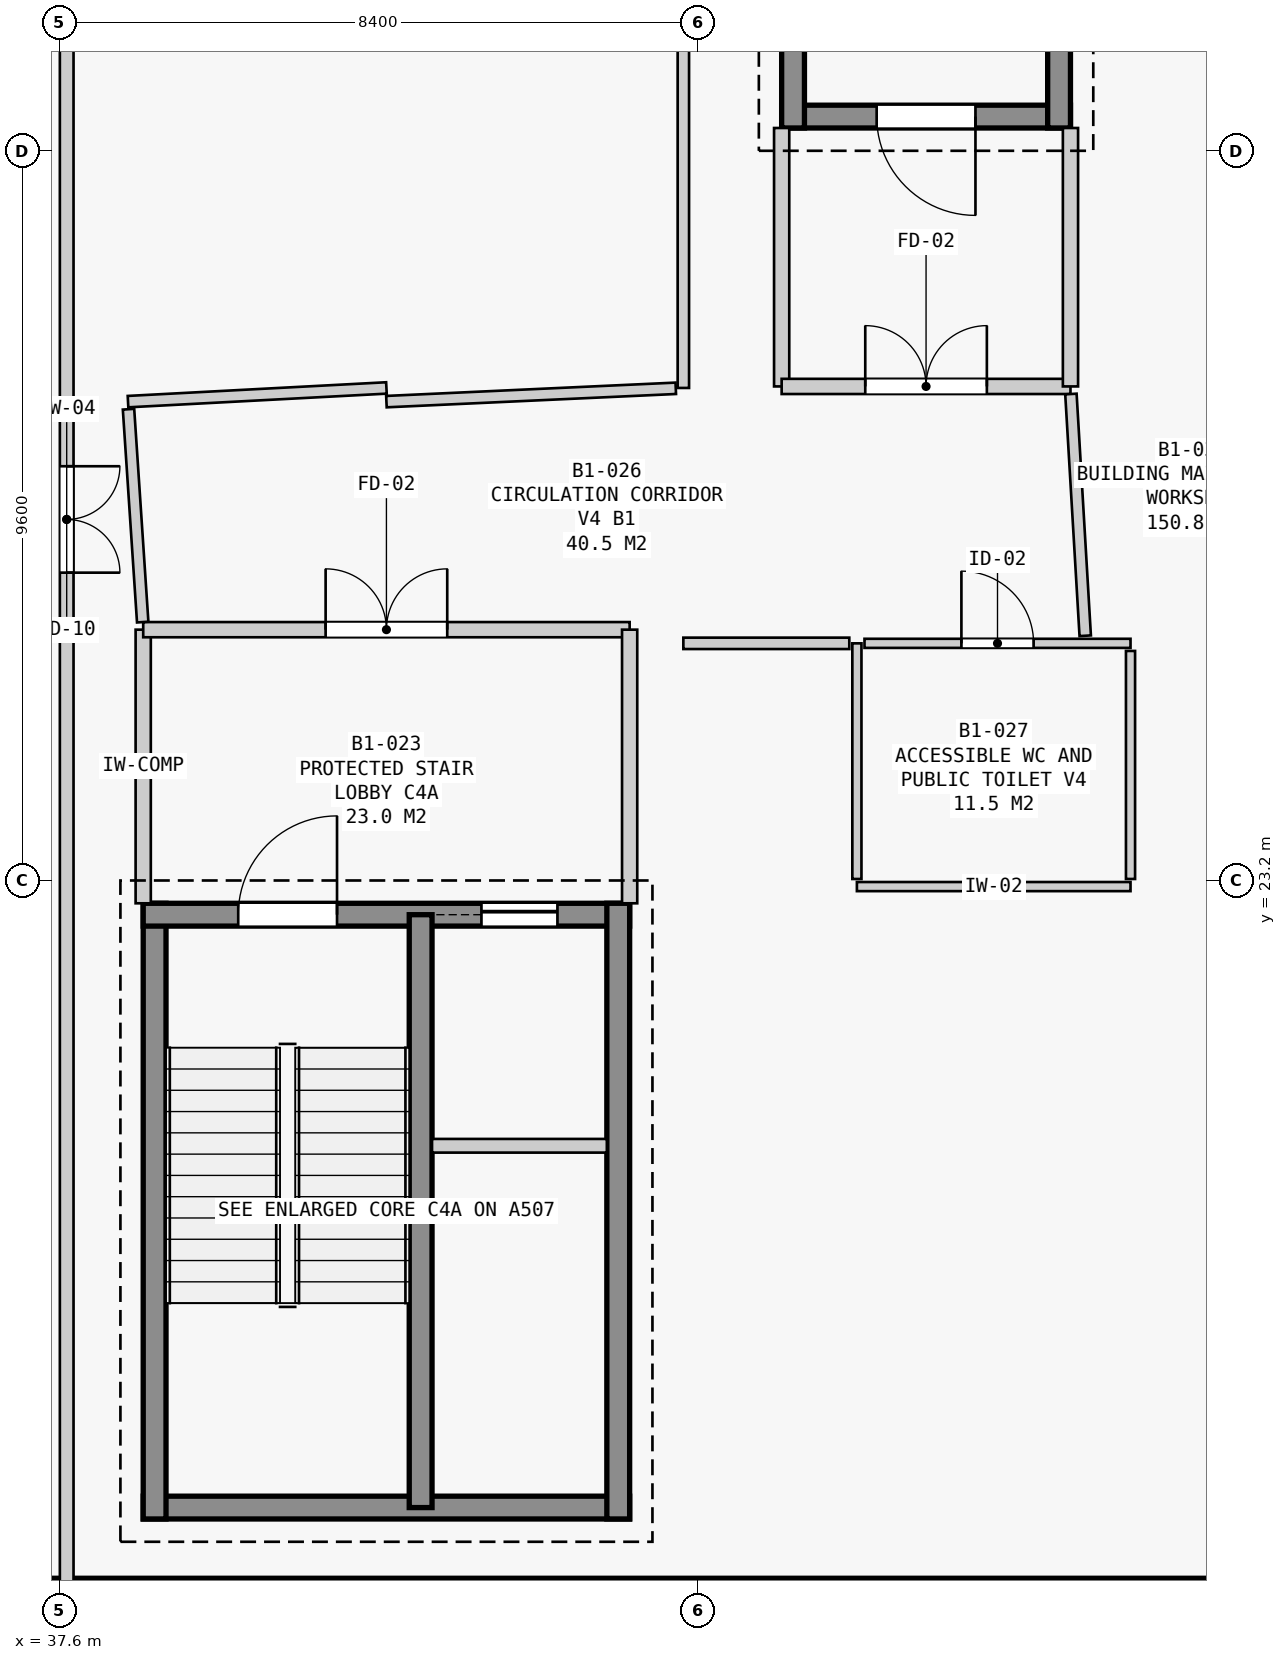
"""IFC4 building model, lengths in metres.
Left out: names, types, materials, properties, quantities, classifications, styles, units other than length and angle.
Written with IfcOpenShell. Run it as: python <this file> out.ifc"""

import sys

from ifc_helpers import new_model, si_unit, direction, frame, frame_2d, origin, place, context, subcontext, project, spatial, rectangle, extrude, element, fill, save


model = new_model("IFC4")
c1 = context("Model", 3, precision=1e-05, world=origin(), true_north=direction((0.0, 1.0)))
c2 = subcontext(c1, "Body", "Model", "MODEL_VIEW")
j1 = project(units=[si_unit("LENGTHUNIT", "METRE"), si_unit("PLANEANGLEUNIT", "RADIAN")], contexts=[c1])
p1 = place(None, origin())
s1 = spatial("IfcSite", under=j1, at=p1, CompositionType="ELEMENT")
p2 = place(p1, origin())
s2 = spatial("IfcBuilding", under=s1, at=p2, CompositionType="ELEMENT")
p3 = place(p2, frame((0.0, 0.0, -4.5)))
s3 = spatial("IfcBuildingStorey", under=s2, at=p3, CompositionType="ELEMENT", Elevation=-4.5)
p4 = place(p3, frame((54.09, 13.81, 0.0), z_axis=(0.0, 0.0, 1.0), x_axis=(-1.0, 0.0, 0.0)))
e1 = element("IfcWall", 1, at=p4, inside=s3, PredefinedType="SOLIDWALL", context=c2, shape_type="SweptSolid", body=[
    extrude(rectangle(XDim=24.68, YDim=0.42, at=frame_2d((12.34, 0.0))), origin(), (0.0, 0.0, 1.0), 4.5),
])
p5 = place(p3, frame((45.1, 14.95, 0.0), z_axis=(0.0, 0.0, 1.0), x_axis=(-1.0, 0.0, 0.0)))
e2 = element("IfcWall", 2, at=p5, inside=s3, PredefinedType="SHEAR", context=c2, shape_type="SweptSolid", body=[
    extrude(rectangle(XDim=6.4, YDim=0.3, at=frame_2d((3.2, 0.0))), origin(), (0.0, 0.0, 1.0), 4.1),
])
p6 = place(p3, frame((38.85, 14.8, 0.0), z_axis=(0.0, 0.0, 1.0), x_axis=(0.0, 1.0, 0.0)))
e3 = element("IfcWall", 3, at=p6, inside=s3, PredefinedType="SHEAR", context=c2, shape_type="SweptSolid", body=[
    extrude(rectangle(XDim=8.1, YDim=0.3, at=frame_2d((4.05, 0.0))), origin(), (0.0, 0.0, 1.0), 4.1),
])
p7 = place(p3, frame((38.7, 22.75, 0.0), z_axis=(0.0, 0.0, 1.0), x_axis=(1.0, 0.0, 0.0)))
e4 = element("IfcWall", 4, at=p7, inside=s3, PredefinedType="SHEAR", context=c2, shape_type="SweptSolid", body=[
    extrude(rectangle(XDim=6.4, YDim=0.3, at=frame_2d((3.2, 0.0))), origin(), (0.0, 0.0, 1.0), 4.1),
])
p8 = place(p7, frame((1.25, 0.0, 0.0)))
e5 = element("IfcOpeningElement", 5, at=p8, cuts=e4, PredefinedType="OPENING", context=c2, shape_type="SweptSolid", body=[
    extrude(rectangle(XDim=1.3, YDim=2.2, at=frame_2d((0.65, 1.1))), frame((0.0, 0.16, 0.0), z_axis=(0.0, -1.0, 0.0), x_axis=(1.0, 0.0, 0.0)), (0.0, 0.0, 1.0), 0.32),
])
p9 = place(p7, frame((4.45, 0.0, 0.0)))
e6 = element("IfcOpeningElement", 6, at=p9, cuts=e4, PredefinedType="OPENING", context=c2, shape_type="SweptSolid", body=[
    extrude(rectangle(XDim=1.0, YDim=2.15, at=frame_2d((0.5, 1.075))), frame((0.0, 0.16, 0.0), z_axis=(0.0, -1.0, 0.0), x_axis=(1.0, 0.0, 0.0)), (0.0, 0.0, 1.0), 0.32),
])
p10 = place(p3, frame((44.95, 22.9, 0.0), z_axis=(0.0, 0.0, 1.0), x_axis=(0.0, -1.0, 0.0)))
e7 = element("IfcWall", 7, at=p10, inside=s3, PredefinedType="SHEAR", context=c2, shape_type="SweptSolid", body=[
    extrude(rectangle(XDim=8.1, YDim=0.3, at=frame_2d((4.05, 0.0))), origin(), (0.0, 0.0, 1.0), 4.1),
])
p11 = place(p3, frame((42.35, 14.95, 0.0), z_axis=(0.0, 0.0, 1.0), x_axis=(0.0, 1.0, 0.0)))
e8 = element("IfcWall", 8, at=p11, inside=s3, PredefinedType="SHEAR", context=c2, shape_type="SweptSolid", body=[
    extrude(rectangle(XDim=7.8, YDim=0.3, at=frame_2d((3.9, 0.0))), origin(), (0.0, 0.0, 1.0), 4.1),
])
p12 = place(p3, frame((42.5, 19.71, 0.0), z_axis=(0.0, 0.0, 1.0), x_axis=(1.0, 0.0, 0.0)))
e9 = element("IfcWall", 9, at=p12, inside=s3, PredefinedType="PARTITIONING", context=c2, shape_type="SweptSolid", body=[
    extrude(rectangle(XDim=2.3, YDim=0.18, at=frame_2d((1.15, 0.0))), origin(), (0.0, 0.0, 1.0), 4.1),
])
p13 = place(p3, frame((38.7, 22.9, 0.0), z_axis=(0.0, 0.0, 1.0), x_axis=(0.0, 1.0, 0.0)))
e10 = element("IfcWall", 10, at=p13, inside=s3, PredefinedType="STANDARD", context=c2, shape_type="SweptSolid", body=[
    extrude(rectangle(XDim=3.6, YDim=0.2, at=frame_2d((1.8, 0.0))), origin(), (0.0, 0.0, 1.0), 3.38),
])
p14 = place(p3, frame((38.7, 26.5, 0.0), z_axis=(0.0, 0.0, 1.0), x_axis=(1.0, 0.0, 0.0)))
e11 = element("IfcWall", 11, at=p14, inside=s3, PredefinedType="STANDARD", context=c2, shape_type="SweptSolid", body=[
    extrude(rectangle(XDim=6.4, YDim=0.2, at=frame_2d((3.2, 0.0))), origin(), (0.0, 0.0, 1.0), 3.63),
])
p15 = place(p14, frame((2.4, 0.0, 0.0)))
e12 = element("IfcOpeningElement", 12, at=p15, cuts=e11, PredefinedType="OPENING", context=c2, shape_type="SweptSolid", body=[
    extrude(rectangle(XDim=1.6, YDim=2.2, at=frame_2d((0.8, 1.1))), frame((0.0, 0.11, 0.0), z_axis=(0.0, -1.0, 0.0), x_axis=(1.0, 0.0, 0.0)), (0.0, 0.0, 1.0), 0.22),
])
p16 = place(p3, frame((45.1, 26.5, 0.0), z_axis=(0.0, 0.0, 1.0), x_axis=(0.0, -1.0, 0.0)))
e13 = element("IfcWall", 13, at=p16, inside=s3, PredefinedType="STANDARD", context=c2, shape_type="SweptSolid", body=[
    extrude(rectangle(XDim=3.6, YDim=0.2, at=frame_2d((1.8, 0.0))), origin(), (0.0, 0.0, 1.0), 3.38),
])
p17 = place(p3, frame((50.9, 33.25, 0.0), z_axis=(0.0, 0.0, 1.0), x_axis=(-1.0, 0.0, 0.0)))
e14 = element("IfcWall", 14, at=p17, inside=s3, PredefinedType="SHEAR", context=c2, shape_type="SweptSolid", body=[
    extrude(rectangle(XDim=3.8, YDim=0.3, at=frame_2d((1.9, 0.0))), origin(), (0.0, 0.0, 1.0), 4.1),
])
p18 = place(p17, frame((1.25, 0.0, 0.0)))
e15 = element("IfcOpeningElement", 15, at=p18, cuts=e14, PredefinedType="OPENING", context=c2, shape_type="SweptSolid", body=[
    extrude(rectangle(XDim=1.3, YDim=2.2, at=frame_2d((0.65, 1.1))), frame((0.0, 0.16, 0.0), z_axis=(0.0, -1.0, 0.0), x_axis=(1.0, 0.0, 0.0)), (0.0, 0.0, 1.0), 0.32),
])
for number, where, z_axis, x_axis in (
    (16, (47.25, 33.1, 0.0), (0.0, 0.0, 1.0), (0.0, 1.0, 0.0)),
    (17, (50.75, 41.2, 0.0), (0.0, 0.0, 1.0), (0.0, -1.0, 0.0)),
):
    element("IfcWall", number, at=place(p3, frame(where, z_axis=z_axis, x_axis=x_axis)), inside=s3, PredefinedType="SHEAR", context=c2, shape_type="SweptSolid", body=[
        extrude(rectangle(XDim=8.1, YDim=0.3, at=frame_2d((4.05, 0.0))), origin(), (0.0, 0.0, 1.0), 4.1),
    ])
p19 = place(p3, frame((47.1, 33.1, 0.0), z_axis=(0.0, 0.0, 1.0), x_axis=(0.0, -1.0, 0.0)))
e18 = element("IfcWall", 18, at=p19, inside=s3, PredefinedType="STANDARD", context=c2, shape_type="SweptSolid", body=[
    extrude(rectangle(XDim=3.4, YDim=0.2, at=frame_2d((1.7, 0.0))), origin(), (0.0, 0.0, 1.0), 3.28),
])
p20 = place(p3, frame((47.1, 29.7, 0.0), z_axis=(0.0, 0.0, 1.0), x_axis=(1.0, 0.0, 0.0)))
e19 = element("IfcWall", 19, at=p20, inside=s3, PredefinedType="STANDARD", context=c2, shape_type="SweptSolid", body=[
    extrude(rectangle(XDim=3.8, YDim=0.2, at=frame_2d((1.9, 0.0))), origin(), (0.0, 0.0, 1.0), 4.1),
])
p21 = place(p20, frame((1.1, 0.0, 0.0)))
e20 = element("IfcOpeningElement", 20, at=p21, cuts=e19, PredefinedType="OPENING", context=c2, shape_type="SweptSolid", body=[
    extrude(rectangle(XDim=1.6, YDim=2.2, at=frame_2d((0.8, 1.1))), frame((0.0, 0.11, 0.0), z_axis=(0.0, -1.0, 0.0), x_axis=(1.0, 0.0, 0.0)), (0.0, 0.0, 1.0), 0.22),
])
p22 = place(p3, frame((50.9, 29.7, 0.0), z_axis=(0.0, 0.0, 1.0), x_axis=(0.0, 1.0, 0.0)))
e21 = element("IfcWall", 21, at=p22, inside=s3, PredefinedType="STANDARD", context=c2, shape_type="SweptSolid", body=[
    extrude(rectangle(XDim=3.4, YDim=0.2, at=frame_2d((1.7, 0.0))), origin(), (0.0, 0.0, 1.0), 3.28),
])
p23 = place(p3, frame((51.69, 23.12, 0.0), z_axis=(0.0, 0.0, 1.0), x_axis=(-1.0, 0.0, 0.0)))
e22 = element("IfcWall", 22, at=p23, inside=s3, PredefinedType="PARTITIONING", context=c2, shape_type="SweptSolid", body=[
    extrude(rectangle(XDim=3.6, YDim=0.12, at=frame_2d((1.8, 0.0))), origin(), (0.0, 0.0, 1.0), 3.38),
])
p24 = place(p3, frame((48.09, 23.22, 0.0), z_axis=(0.0, 0.0, 1.0), x_axis=(0.0, 1.0, 0.0)))
e23 = element("IfcWall", 23, at=p24, inside=s3, PredefinedType="PARTITIONING", context=c2, shape_type="SweptSolid", body=[
    extrude(rectangle(XDim=3.1, YDim=0.12, at=frame_2d((1.55, 0.0))), origin(), (0.0, 0.0, 1.0), 3.38),
])
p25 = place(p3, frame((48.19, 26.32, 0.0), z_axis=(0.0, 0.0, 1.0), x_axis=(1.0, 0.0, 0.0)))
e24 = element("IfcWall", 24, at=p25, inside=s3, PredefinedType="PARTITIONING", context=c2, shape_type="SweptSolid", body=[
    extrude(rectangle(XDim=3.5, YDim=0.12, at=frame_2d((1.75, 0.0))), origin(), (0.0, 0.0, 1.0), 4.1),
])
p26 = place(p25, frame((1.275, 0.0, 0.0)))
e25 = element("IfcOpeningElement", 25, at=p26, cuts=e24, PredefinedType="OPENING", context=c2, shape_type="SweptSolid", body=[
    extrude(rectangle(XDim=0.95, YDim=2.15, at=frame_2d((0.475, 1.075))), frame((0.0, 0.07, 0.0), z_axis=(0.0, -1.0, 0.0), x_axis=(1.0, 0.0, 0.0)), (0.0, 0.0, 1.0), 0.14),
])
p27 = place(p3, frame((51.69, 26.22, 0.0), z_axis=(0.0, 0.0, 1.0), x_axis=(0.0, -1.0, 0.0)))
e26 = element("IfcWall", 26, at=p27, inside=s3, PredefinedType="PARTITIONING", context=c2, shape_type="SweptSolid", body=[
    extrude(rectangle(XDim=3.0, YDim=0.12, at=frame_2d((1.5, 0.0))), origin(), (0.0, 0.0, 1.0), 3.38),
])
p28 = place(p3, frame((37.693, 41.99, 0.0), z_axis=(0.0, 0.0, 1.0), x_axis=(0.0, -1.0, 0.0)))
e27 = element("IfcWall", 27, at=p28, inside=s3, PredefinedType="PARTITIONING", context=c2, shape_type="SweptSolid", body=[
    extrude(rectangle(XDim=28.08, YDim=0.18, at=frame_2d((14.04, 0.0))), origin(), (0.0, 0.0, 1.0), 3.28),
])
p29 = place(p28, frame((13.34, 0.0, 0.0)))
e28 = element("IfcOpeningElement", 28, at=p29, cuts=e27, PredefinedType="OPENING", context=c2, shape_type="SweptSolid", body=[
    extrude(rectangle(XDim=1.4, YDim=2.2, at=frame_2d((0.7, 1.1))), frame((0.0, 0.1, 0.0), z_axis=(0.0, -1.0, 0.0), x_axis=(1.0, 0.0, 0.0)), (0.0, 0.0, 1.0), 0.2),
])
p30 = place(p3, frame((45.807, 41.99, 0.0), z_axis=(0.0, 0.0, 1.0), x_axis=(0.0, -1.0, 0.0)))
e29 = element("IfcWall", 29, at=p30, inside=s3, PredefinedType="PARTITIONING", context=c2, shape_type="SweptSolid", body=[
    extrude(rectangle(XDim=12.31, YDim=0.15, at=frame_2d((6.155, 0.0))), origin(), (0.0, 0.0, 1.0), 3.28),
])
p31 = place(p30, frame((5.73, 0.0, 0.0)))
e30 = element("IfcOpeningElement", 30, at=p31, cuts=e29, PredefinedType="OPENING", context=c2, shape_type="SweptSolid", body=[
    extrude(rectangle(XDim=0.85, YDim=2.1, at=frame_2d((0.425, 1.05))), frame((0.0, 0.085, 0.0), z_axis=(0.0, -1.0, 0.0), x_axis=(1.0, 0.0, 0.0)), (0.0, 0.0, 1.0), 0.17),
])
p32 = place(p30, frame((4.38, 0.0, 0.0)))
e31 = element("IfcOpeningElement", 31, at=p32, cuts=e29, PredefinedType="OPENING", context=c2, shape_type="SweptSolid", body=[
    extrude(rectangle(XDim=0.85, YDim=2.1, at=frame_2d((0.425, 1.05))), frame((0.0, 0.085, 0.0), z_axis=(0.0, -1.0, 0.0), x_axis=(1.0, 0.0, 0.0)), (0.0, 0.0, 1.0), 0.17),
])
p33 = place(p3, frame((45.707, 29.675, 0.0), z_axis=(0.0, 0.0, 1.0), x_axis=(-0.998941551841, -0.045997565204, 0.0)))
e32 = element("IfcWall", 32, at=p33, inside=s3, PredefinedType="PARTITIONING", context=c2, shape_type="SweptSolid", body=[
    extrude(rectangle(XDim=3.811, YDim=0.15, at=frame_2d((1.906, 0.0))), origin(), (0.0, 0.0, 1.0), 3.63),
])
p34 = place(p3, frame((41.9, 29.68, 0.0), z_axis=(0.0, 0.0, 1.0), x_axis=(-0.998602534522, -0.052848633344, 0.0)))
e33 = element("IfcWall", 33, at=p34, inside=s3, PredefinedType="PARTITIONING", context=c2, shape_type="SweptSolid", body=[
    extrude(rectangle(XDim=3.405, YDim=0.15, at=frame_2d((1.702, 0.0))), origin(), (0.0, 0.0, 1.0), 4.1),
])
p35 = place(p3, frame((38.507, 29.4, 0.0), z_axis=(0.0, 0.0, 1.0), x_axis=(0.066547879088, -0.997783232866, 0.0)))
e34 = element("IfcWall", 34, at=p35, inside=s3, PredefinedType="PARTITIONING", context=c2, shape_type="SweptSolid", body=[
    extrude(rectangle(XDim=2.806, YDim=0.15, at=frame_2d((1.403, 0.0))), origin(), (0.0, 0.0, 1.0), 4.1),
])
p36 = place(p3, frame((45.807, 26.32, 0.0), z_axis=(0.0, 0.0, 1.0), x_axis=(1.0, 0.0, 0.0)))
e35 = element("IfcWall", 35, at=p36, inside=s3, PredefinedType="PARTITIONING", context=c2, shape_type="SweptSolid", body=[
    extrude(rectangle(XDim=2.183, YDim=0.15, at=frame_2d((1.092, 0.0))), origin(), (0.0, 0.0, 1.0), 4.1),
])
p37 = place(p3, frame((51.094, 26.42, 0.0), z_axis=(0.0, 0.0, 1.0), x_axis=(-0.059009535749, 0.998257419051, 0.0)))
e36 = element("IfcWall", 36, at=p37, inside=s3, PredefinedType="PARTITIONING", context=c2, shape_type="SweptSolid", body=[
    extrude(rectangle(XDim=3.186, YDim=0.15, at=frame_2d((1.593, 0.0))), origin(), (0.0, 0.0, 1.0), 4.1),
])
p38 = place(p8, origin())
e37 = element("IfcDoor", 37, at=p38, inside=s3, OperationType="SINGLE_SWING_RIGHT", PredefinedType="DOOR", context=c2, shape_type="SweptSolid", body=[
    extrude(rectangle(XDim=1.3, YDim=2.2, at=frame_2d((0.65, 1.1))), frame((0.0, 0.025, 0.0), z_axis=(0.0, -1.0, 0.0), x_axis=(1.0, 0.0, 0.0)), (0.0, 0.0, 1.0), 0.05),
])
fill(e5, e37)
p39 = place(p9, origin())
e38 = element("IfcDoor", 38, at=p39, inside=s3, OperationType="SLIDING_TO_LEFT", PredefinedType="DOOR", context=c2, shape_type="SweptSolid", body=[
    extrude(rectangle(XDim=1.0, YDim=2.15, at=frame_2d((0.5, 1.075))), frame((0.0, 0.025, 0.0), z_axis=(0.0, -1.0, 0.0), x_axis=(1.0, 0.0, 0.0)), (0.0, 0.0, 1.0), 0.05),
])
fill(e6, e38)
p40 = place(p18, origin())
e39 = element("IfcDoor", 39, at=p40, inside=s3, OperationType="SINGLE_SWING_LEFT", PredefinedType="DOOR", context=c2, shape_type="SweptSolid", body=[
    extrude(rectangle(XDim=1.3, YDim=2.2, at=frame_2d((0.65, 1.1))), frame((0.0, 0.025, 0.0), z_axis=(0.0, -1.0, 0.0), x_axis=(1.0, 0.0, 0.0)), (0.0, 0.0, 1.0), 0.05),
])
fill(e15, e39)
p41 = place(p15, origin())
e40 = element("IfcDoor", 40, at=p41, inside=s3, OperationType="DOUBLE_DOOR_SINGLE_SWING", PredefinedType="DOOR", context=c2, shape_type="SweptSolid", body=[
    extrude(rectangle(XDim=1.6, YDim=2.2, at=frame_2d((0.8, 1.1))), frame((0.0, 0.025, 0.0), z_axis=(0.0, -1.0, 0.0), x_axis=(1.0, 0.0, 0.0)), (0.0, 0.0, 1.0), 0.05),
])
fill(e12, e40)
p42 = place(p21, origin())
e41 = element("IfcDoor", 41, at=p42, inside=s3, OperationType="DOUBLE_DOOR_SINGLE_SWING", PredefinedType="DOOR", context=c2, shape_type="SweptSolid", body=[
    extrude(rectangle(XDim=1.6, YDim=2.2, at=frame_2d((0.8, 1.1))), frame((0.0, 0.025, 0.0), z_axis=(0.0, -1.0, 0.0), x_axis=(1.0, 0.0, 0.0)), (0.0, 0.0, 1.0), 0.05),
])
fill(e20, e41)
p43 = place(p26, origin())
e42 = element("IfcDoor", 42, at=p43, inside=s3, OperationType="SINGLE_SWING_LEFT", PredefinedType="DOOR", context=c2, shape_type="SweptSolid", body=[
    extrude(rectangle(XDim=0.95, YDim=2.15, at=frame_2d((0.475, 1.075))), frame((0.0, 0.025, 0.0), z_axis=(0.0, -1.0, 0.0), x_axis=(1.0, 0.0, 0.0)), (0.0, 0.0, 1.0), 0.05),
])
fill(e25, e42)
p44 = place(p29, origin())
e43 = element("IfcDoor", 43, at=p44, inside=s3, OperationType="DOUBLE_DOOR_SINGLE_SWING", PredefinedType="DOOR", context=c2, shape_type="SweptSolid", body=[
    extrude(rectangle(XDim=1.4, YDim=2.2, at=frame_2d((0.7, 1.1))), frame((0.0, 0.025, 0.0), z_axis=(0.0, -1.0, 0.0), x_axis=(1.0, 0.0, 0.0)), (0.0, 0.0, 1.0), 0.05),
])
fill(e28, e43)
save(model, sys.argv[1])
